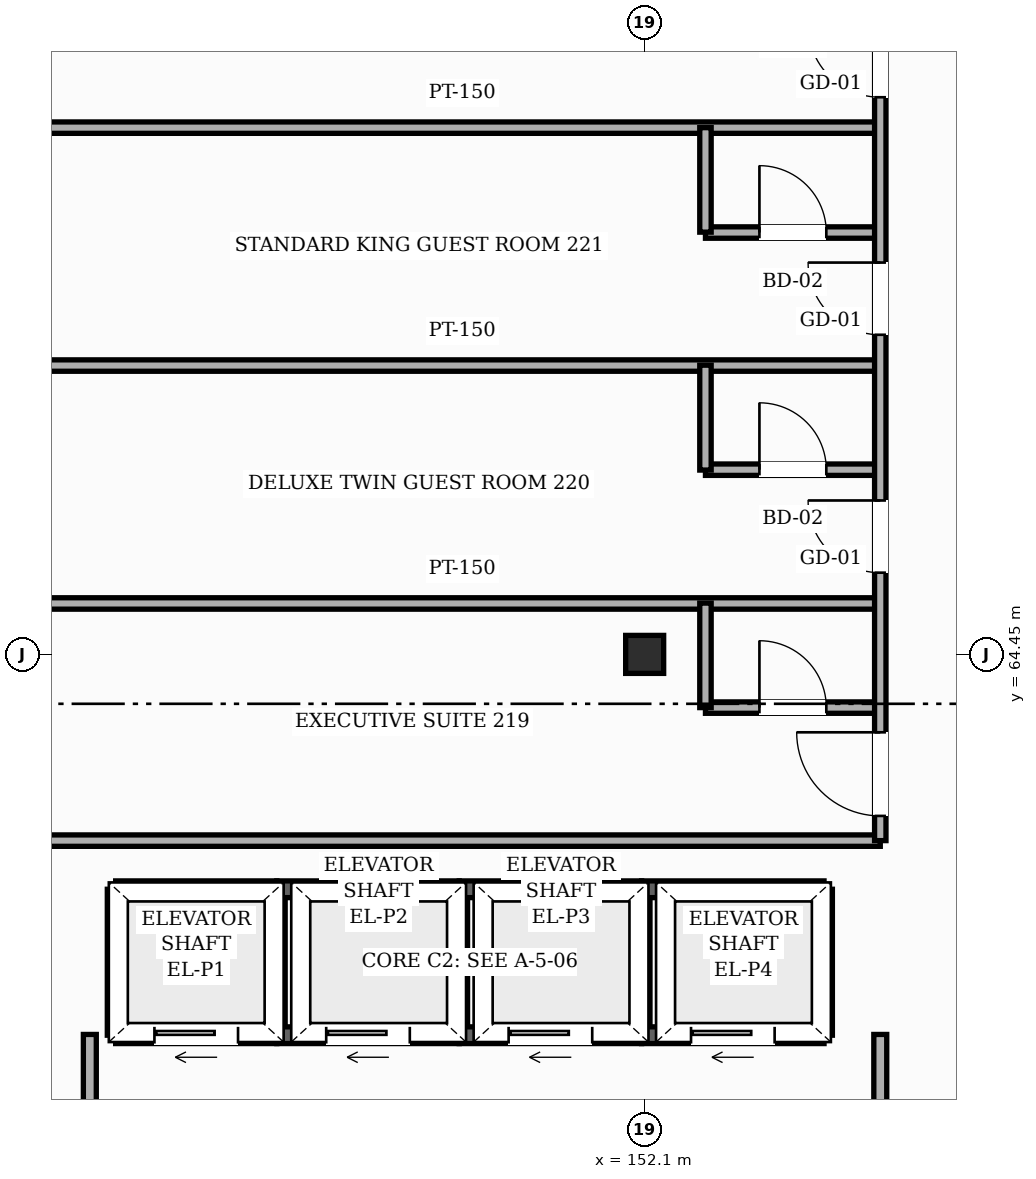
"""IFC4 building model, lengths in metres.
Left out: names, types, materials, properties, quantities, classifications, styles, units other than length and angle.
Written with IfcOpenShell. Run it as: python <this file> out.ifc"""

import sys

from ifc_helpers import new_model, si_unit, direction, frame, frame_2d, origin, origin_2d, place, context, subcontext, project, spatial, rectangle, hollow_rectangle, extrude, element, fill, save


model = new_model("IFC4")
c1 = context("Model", 3, precision=1e-05, world=origin(), true_north=direction((0.0, 1.0)))
c2 = subcontext(c1, "Body", "Model", "MODEL_VIEW")
j1 = project(units=[si_unit("LENGTHUNIT", "METRE"), si_unit("PLANEANGLEUNIT", "RADIAN")], contexts=[c1])
p1 = place(None, origin())
s1 = spatial("IfcSite", under=j1, at=p1, CompositionType="ELEMENT")
p2 = place(p1, origin())
s2 = spatial("IfcBuilding", under=s1, at=p2, CompositionType="ELEMENT")
p3 = place(p2, frame((0.0, 0.0, 35.4)))
s3 = spatial("IfcBuildingStorey", under=s2, at=p3, CompositionType="ELEMENT", Elevation=35.4)
p4 = place(p3, frame((152.1, 64.45, 0.0), z_axis=(0.0, 0.0, 1.0), x_axis=(1.0, 0.0, 0.0)))
e1 = element("IfcColumn", 1, at=p4, inside=s3, PredefinedType="COLUMN", context=c2, shape_type="SweptSolid", body=[
    extrude(hollow_rectangle(XDim=0.5, YDim=0.5, WallThickness=0.022, InnerFilletRadius=0.022, OuterFilletRadius=0.044, at=origin_2d()), origin(), (0.0, 0.0, 1.0), 3.6),
])
p5 = place(p3, frame((145.14, 61.36, 0.0), z_axis=(0.0, 0.0, 1.0), x_axis=(1.0, 0.0, 0.0)))
e2 = element("IfcWall", 2, at=p5, inside=s3, PredefinedType="SHEAR", context=c2, shape_type="SweptSolid", body=[
    extrude(rectangle(XDim=2.12, YDim=0.22, at=frame_2d((1.06, 0.0))), origin(), (0.0, 0.0, 1.0), 3.38),
])
p6 = place(p3, frame((145.14, 59.44, 0.0), z_axis=(0.0, 0.0, 1.0), x_axis=(1.0, 0.0, 0.0)))
e3 = element("IfcWall", 3, at=p6, inside=s3, PredefinedType="SHEAR", context=c2, shape_type="SweptSolid", body=[
    extrude(rectangle(XDim=2.12, YDim=0.22, at=frame_2d((1.06, 0.0))), origin(), (0.0, 0.0, 1.0), 3.38),
])
p7 = place(p6, frame((0.51, 0.0, 0.0)))
e4 = element("IfcOpeningElement", 4, at=p7, cuts=e3, PredefinedType="OPENING", context=c2, shape_type="SweptSolid", body=[
    extrude(rectangle(XDim=1.1, YDim=2.2, at=frame_2d((0.55, 1.1))), frame((0.0, 0.12, 0.0), z_axis=(0.0, -1.0, 0.0), x_axis=(1.0, 0.0, 0.0)), (0.0, 0.0, 1.0), 0.24),
])
for number, where, z_axis, x_axis in (
    (5, (147.26, 59.44, 0.0), (0.0, 0.0, 1.0), (0.0, 1.0, 0.0)),
    (6, (145.14, 59.44, 0.0), (0.0, 0.0, 1.0), (0.0, 1.0, 0.0)),
):
    element("IfcWall", number, at=place(p3, frame(where, z_axis=z_axis, x_axis=x_axis)), inside=s3, PredefinedType="SHEAR", context=c2, shape_type="SweptSolid", body=[
        extrude(rectangle(XDim=1.92, YDim=0.22, at=frame_2d((0.96, 0.0))), origin(), (0.0, 0.0, 1.0), 3.38),
    ])
p8 = place(p3, frame((147.26, 61.36, 0.0), z_axis=(0.0, 0.0, 1.0), x_axis=(1.0, 0.0, 0.0)))
e7 = element("IfcWall", 7, at=p8, inside=s3, PredefinedType="SHEAR", context=c2, shape_type="SweptSolid", body=[
    extrude(rectangle(XDim=2.4, YDim=0.22, at=frame_2d((1.2, 0.0))), origin(), (0.0, 0.0, 1.0), 3.38),
])
p9 = place(p3, frame((147.26, 59.44, 0.0), z_axis=(0.0, 0.0, 1.0), x_axis=(1.0, 0.0, 0.0)))
e8 = element("IfcWall", 8, at=p9, inside=s3, PredefinedType="SHEAR", context=c2, shape_type="SweptSolid", body=[
    extrude(rectangle(XDim=2.4, YDim=0.22, at=frame_2d((1.2, 0.0))), origin(), (0.0, 0.0, 1.0), 3.38),
])
p10 = place(p9, frame((0.65, 0.0, 0.0)))
e9 = element("IfcOpeningElement", 9, at=p10, cuts=e8, PredefinedType="OPENING", context=c2, shape_type="SweptSolid", body=[
    extrude(rectangle(XDim=1.1, YDim=2.2, at=frame_2d((0.55, 1.1))), frame((0.0, 0.12, 0.0), z_axis=(0.0, -1.0, 0.0), x_axis=(1.0, 0.0, 0.0)), (0.0, 0.0, 1.0), 0.24),
])
p11 = place(p3, frame((149.66, 59.44, 0.0), z_axis=(0.0, 0.0, 1.0), x_axis=(0.0, 1.0, 0.0)))
e10 = element("IfcWall", 10, at=p11, inside=s3, PredefinedType="SHEAR", context=c2, shape_type="SweptSolid", body=[
    extrude(rectangle(XDim=1.92, YDim=0.22, at=frame_2d((0.96, 0.0))), origin(), (0.0, 0.0, 1.0), 3.38),
])
p12 = place(p3, frame((149.66, 61.36, 0.0), z_axis=(0.0, 0.0, 1.0), x_axis=(1.0, 0.0, 0.0)))
e11 = element("IfcWall", 11, at=p12, inside=s3, PredefinedType="SHEAR", context=c2, shape_type="SweptSolid", body=[
    extrude(rectangle(XDim=2.4, YDim=0.22, at=frame_2d((1.2, 0.0))), origin(), (0.0, 0.0, 1.0), 3.38),
])
p13 = place(p3, frame((149.66, 59.44, 0.0), z_axis=(0.0, 0.0, 1.0), x_axis=(1.0, 0.0, 0.0)))
e12 = element("IfcWall", 12, at=p13, inside=s3, PredefinedType="SHEAR", context=c2, shape_type="SweptSolid", body=[
    extrude(rectangle(XDim=2.4, YDim=0.22, at=frame_2d((1.2, 0.0))), origin(), (0.0, 0.0, 1.0), 3.38),
])
p14 = place(p13, frame((0.65, 0.0, 0.0)))
e13 = element("IfcOpeningElement", 13, at=p14, cuts=e12, PredefinedType="OPENING", context=c2, shape_type="SweptSolid", body=[
    extrude(rectangle(XDim=1.1, YDim=2.2, at=frame_2d((0.55, 1.1))), frame((0.0, 0.12, 0.0), z_axis=(0.0, -1.0, 0.0), x_axis=(1.0, 0.0, 0.0)), (0.0, 0.0, 1.0), 0.24),
])
p15 = place(p3, frame((152.06, 59.44, 0.0), z_axis=(0.0, 0.0, 1.0), x_axis=(0.0, 1.0, 0.0)))
e14 = element("IfcWall", 14, at=p15, inside=s3, PredefinedType="SHEAR", context=c2, shape_type="SweptSolid", body=[
    extrude(rectangle(XDim=1.92, YDim=0.22, at=frame_2d((0.96, 0.0))), origin(), (0.0, 0.0, 1.0), 3.38),
])
p16 = place(p3, frame((152.06, 61.36, 0.0), z_axis=(0.0, 0.0, 1.0), x_axis=(1.0, 0.0, 0.0)))
e15 = element("IfcWall", 15, at=p16, inside=s3, PredefinedType="SHEAR", context=c2, shape_type="SweptSolid", body=[
    extrude(rectangle(XDim=2.4, YDim=0.22, at=frame_2d((1.2, 0.0))), origin(), (0.0, 0.0, 1.0), 3.38),
])
p17 = place(p3, frame((152.06, 59.44, 0.0), z_axis=(0.0, 0.0, 1.0), x_axis=(1.0, 0.0, 0.0)))
e16 = element("IfcWall", 16, at=p17, inside=s3, PredefinedType="SHEAR", context=c2, shape_type="SweptSolid", body=[
    extrude(rectangle(XDim=2.4, YDim=0.22, at=frame_2d((1.2, 0.0))), origin(), (0.0, 0.0, 1.0), 3.38),
])
p18 = place(p17, frame((0.65, 0.0, 0.0)))
e17 = element("IfcOpeningElement", 17, at=p18, cuts=e16, PredefinedType="OPENING", context=c2, shape_type="SweptSolid", body=[
    extrude(rectangle(XDim=1.1, YDim=2.2, at=frame_2d((0.55, 1.1))), frame((0.0, 0.12, 0.0), z_axis=(0.0, -1.0, 0.0), x_axis=(1.0, 0.0, 0.0)), (0.0, 0.0, 1.0), 0.24),
])
p19 = place(p3, frame((154.46, 59.44, 0.0), z_axis=(0.0, 0.0, 1.0), x_axis=(0.0, 1.0, 0.0)))
e18 = element("IfcWall", 18, at=p19, inside=s3, PredefinedType="SHEAR", context=c2, shape_type="SweptSolid", body=[
    extrude(rectangle(XDim=1.92, YDim=0.22, at=frame_2d((0.96, 0.0))), origin(), (0.0, 0.0, 1.0), 3.38),
])
p20 = place(p3, frame((144.2, 62.0, 0.0), z_axis=(0.0, 0.0, 1.0), x_axis=(1.0, 0.0, 0.0)))
e19 = element("IfcWall", 19, at=p20, inside=s3, PredefinedType="PARTITIONING", context=c2, shape_type="SweptSolid", body=[
    extrude(rectangle(XDim=11.0, YDim=0.15, at=frame_2d((5.5, 0.0))), origin(), (0.0, 0.0, 1.0), 3.365),
])
p21 = place(p3, frame((152.9, 63.75, 0.0), z_axis=(0.0, 0.0, 1.0), x_axis=(1.0, 0.0, 0.0)))
e20 = element("IfcWall", 20, at=p21, inside=s3, PredefinedType="PARTITIONING", context=c2, shape_type="SweptSolid", body=[
    extrude(rectangle(XDim=2.3, YDim=0.15, at=frame_2d((1.15, 0.0))), origin(), (0.0, 0.0, 1.0), 3.365),
])
p22 = place(p21, frame((0.71, 0.0, 0.0)))
e21 = element("IfcOpeningElement", 21, at=p22, cuts=e20, PredefinedType="OPENING", context=c2, shape_type="SweptSolid", body=[
    extrude(rectangle(XDim=0.88, YDim=2.12, at=frame_2d((0.44, 1.06))), frame((0.0, 0.085, 0.0), z_axis=(0.0, -1.0, 0.0), x_axis=(1.0, 0.0, 0.0)), (0.0, 0.0, 1.0), 0.17),
])
p23 = place(p3, frame((144.2, 65.12, 0.0), z_axis=(0.0, 0.0, 1.0), x_axis=(1.0, 0.0, 0.0)))
e22 = element("IfcWall", 22, at=p23, inside=s3, PredefinedType="PARTITIONING", context=c2, shape_type="SweptSolid", body=[
    extrude(rectangle(XDim=11.0, YDim=0.15, at=frame_2d((5.5, 0.0))), origin(), (0.0, 0.0, 1.0), 3.365),
])
p24 = place(p3, frame((152.9, 66.88, 0.0), z_axis=(0.0, 0.0, 1.0), x_axis=(1.0, 0.0, 0.0)))
e23 = element("IfcWall", 23, at=p24, inside=s3, PredefinedType="PARTITIONING", context=c2, shape_type="SweptSolid", body=[
    extrude(rectangle(XDim=2.3, YDim=0.15, at=frame_2d((1.15, 0.0))), origin(), (0.0, 0.0, 1.0), 3.365),
])
p25 = place(p24, frame((0.71, 0.0, 0.0)))
e24 = element("IfcOpeningElement", 24, at=p25, cuts=e23, PredefinedType="OPENING", context=c2, shape_type="SweptSolid", body=[
    extrude(rectangle(XDim=0.88, YDim=2.12, at=frame_2d((0.44, 1.06))), frame((0.0, 0.085, 0.0), z_axis=(0.0, -1.0, 0.0), x_axis=(1.0, 0.0, 0.0)), (0.0, 0.0, 1.0), 0.17),
])
p26 = place(p3, frame((144.2, 68.25, 0.0), z_axis=(0.0, 0.0, 1.0), x_axis=(1.0, 0.0, 0.0)))
e25 = element("IfcWall", 25, at=p26, inside=s3, PredefinedType="PARTITIONING", context=c2, shape_type="SweptSolid", body=[
    extrude(rectangle(XDim=11.0, YDim=0.15, at=frame_2d((5.5, 0.0))), origin(), (0.0, 0.0, 1.0), 3.365),
])
p27 = place(p3, frame((152.9, 70.0, 0.0), z_axis=(0.0, 0.0, 1.0), x_axis=(1.0, 0.0, 0.0)))
e26 = element("IfcWall", 26, at=p27, inside=s3, PredefinedType="PARTITIONING", context=c2, shape_type="SweptSolid", body=[
    extrude(rectangle(XDim=2.3, YDim=0.15, at=frame_2d((1.15, 0.0))), origin(), (0.0, 0.0, 1.0), 3.365),
])
p28 = place(p27, frame((0.71, 0.0, 0.0)))
e27 = element("IfcOpeningElement", 27, at=p28, cuts=e26, PredefinedType="OPENING", context=c2, shape_type="SweptSolid", body=[
    extrude(rectangle(XDim=0.88, YDim=2.12, at=frame_2d((0.44, 1.06))), frame((0.0, 0.085, 0.0), z_axis=(0.0, -1.0, 0.0), x_axis=(1.0, 0.0, 0.0)), (0.0, 0.0, 1.0), 0.17),
])
p29 = place(p3, frame((144.2, 71.38, 0.0), z_axis=(0.0, 0.0, 1.0), x_axis=(1.0, 0.0, 0.0)))
e28 = element("IfcWall", 28, at=p29, inside=s3, PredefinedType="PARTITIONING", context=c2, shape_type="SweptSolid", body=[
    extrude(rectangle(XDim=11.0, YDim=0.15, at=frame_2d((5.5, 0.0))), origin(), (0.0, 0.0, 1.0), 3.365),
])
p30 = place(p3, frame((144.8, 53.0, 0.0), z_axis=(0.0, 0.0, 1.0), x_axis=(0.0, 1.0, 0.0)))
e29 = element("IfcWall", 29, at=p30, inside=s3, PredefinedType="PARTITIONING", context=c2, shape_type="SweptSolid", body=[
    extrude(rectangle(XDim=6.45, YDim=0.17, at=frame_2d((3.225, 0.0))), origin(), (0.0, 0.0, 1.0), 3.365),
])
p31 = place(p3, frame((152.9, 63.75, 0.0), z_axis=(0.0, 0.0, 1.0), x_axis=(0.0, 1.0, 0.0)))
e30 = element("IfcWall", 30, at=p31, inside=s3, PredefinedType="PARTITIONING", context=c2, shape_type="SweptSolid", body=[
    extrude(rectangle(XDim=1.375, YDim=0.15, at=frame_2d((0.688, 0.0))), origin(), (0.0, 0.0, 1.0), 3.365),
])
p32 = place(p3, frame((152.9, 66.875, 0.0), z_axis=(0.0, 0.0, 1.0), x_axis=(0.0, 1.0, 0.0)))
e31 = element("IfcWall", 31, at=p32, inside=s3, PredefinedType="PARTITIONING", context=c2, shape_type="SweptSolid", body=[
    extrude(rectangle(XDim=1.38, YDim=0.15, at=frame_2d((0.69, 0.0))), origin(), (0.0, 0.0, 1.0), 3.365),
])
p33 = place(p3, frame((152.9, 70.005, 0.0), z_axis=(0.0, 0.0, 1.0), x_axis=(0.0, 1.0, 0.0)))
e32 = element("IfcWall", 32, at=p33, inside=s3, PredefinedType="PARTITIONING", context=c2, shape_type="SweptSolid", body=[
    extrude(rectangle(XDim=1.375, YDim=0.15, at=frame_2d((0.688, 0.0))), origin(), (0.0, 0.0, 1.0), 3.365),
])
p34 = place(p3, frame((155.2, 53.0, 0.0), z_axis=(0.0, 0.0, 1.0), x_axis=(0.0, 1.0, 0.0)))
e33 = element("IfcWall", 33, at=p34, inside=s3, PredefinedType="PARTITIONING", context=c2, shape_type="SweptSolid", body=[
    extrude(rectangle(XDim=6.45, YDim=0.17, at=frame_2d((3.225, 0.0))), origin(), (0.0, 0.0, 1.0), 3.365),
])
p35 = place(p34, frame((2.625, 0.0, 0.0)))
e34 = element("IfcOpeningElement", 34, at=p35, cuts=e33, PredefinedType="OPENING", context=c2, shape_type="SweptSolid", body=[
    extrude(rectangle(XDim=1.2, YDim=2.2, at=frame_2d((0.6, 1.1))), frame((0.0, 0.095, 0.0), z_axis=(0.0, -1.0, 0.0), x_axis=(1.0, 0.0, 0.0)), (0.0, 0.0, 1.0), 0.19),
])
p36 = place(p3, frame((155.2, 62.0, 0.0), z_axis=(0.0, 0.0, 1.0), x_axis=(0.0, 1.0, 0.0)))
e35 = element("IfcWall", 35, at=p36, inside=s3, PredefinedType="PARTITIONING", context=c2, shape_type="SweptSolid", body=[
    extrude(rectangle(XDim=34.4, YDim=0.15, at=frame_2d((17.2, 0.0))), origin(), (0.0, 0.0, 1.0), 3.365),
])
p37 = place(p36, frame((0.325, 0.0, 0.0)))
e36 = element("IfcOpeningElement", 36, at=p37, cuts=e35, PredefinedType="OPENING", context=c2, shape_type="SweptSolid", body=[
    extrude(rectangle(XDim=1.1, YDim=2.2, at=frame_2d((0.55, 1.1))), frame((0.0, 0.085, 0.0), z_axis=(0.0, -1.0, 0.0), x_axis=(1.0, 0.0, 0.0)), (0.0, 0.0, 1.0), 0.17),
])
p38 = place(p36, frame((3.525, 0.0, 0.0)))
e37 = element("IfcOpeningElement", 37, at=p38, cuts=e35, PredefinedType="OPENING", context=c2, shape_type="SweptSolid", body=[
    extrude(rectangle(XDim=0.95, YDim=2.15, at=frame_2d((0.475, 1.075))), frame((0.0, 0.085, 0.0), z_axis=(0.0, -1.0, 0.0), x_axis=(1.0, 0.0, 0.0)), (0.0, 0.0, 1.0), 0.17),
])
p39 = place(p36, frame((6.655, 0.0, 0.0)))
e38 = element("IfcOpeningElement", 38, at=p39, cuts=e35, PredefinedType="OPENING", context=c2, shape_type="SweptSolid", body=[
    extrude(rectangle(XDim=0.95, YDim=2.15, at=frame_2d((0.475, 1.075))), frame((0.0, 0.085, 0.0), z_axis=(0.0, -1.0, 0.0), x_axis=(1.0, 0.0, 0.0)), (0.0, 0.0, 1.0), 0.17),
])
p40 = place(p36, frame((9.78, 0.0, 0.0)))
e39 = element("IfcOpeningElement", 39, at=p40, cuts=e35, PredefinedType="OPENING", context=c2, shape_type="SweptSolid", body=[
    extrude(rectangle(XDim=0.95, YDim=2.15, at=frame_2d((0.475, 1.075))), frame((0.0, 0.085, 0.0), z_axis=(0.0, -1.0, 0.0), x_axis=(1.0, 0.0, 0.0)), (0.0, 0.0, 1.0), 0.17),
])
p41 = place(p36, frame((12.91, 0.0, 0.0)))
e40 = element("IfcOpeningElement", 40, at=p41, cuts=e35, PredefinedType="OPENING", context=c2, shape_type="SweptSolid", body=[
    extrude(rectangle(XDim=0.95, YDim=2.15, at=frame_2d((0.475, 1.075))), frame((0.0, 0.085, 0.0), z_axis=(0.0, -1.0, 0.0), x_axis=(1.0, 0.0, 0.0)), (0.0, 0.0, 1.0), 0.17),
])
p42 = place(p36, frame((16.035, 0.0, 0.0)))
e41 = element("IfcOpeningElement", 41, at=p42, cuts=e35, PredefinedType="OPENING", context=c2, shape_type="SweptSolid", body=[
    extrude(rectangle(XDim=0.95, YDim=2.15, at=frame_2d((0.475, 1.075))), frame((0.0, 0.085, 0.0), z_axis=(0.0, -1.0, 0.0), x_axis=(1.0, 0.0, 0.0)), (0.0, 0.0, 1.0), 0.17),
])
p43 = place(p36, frame((19.165, 0.0, 0.0)))
e42 = element("IfcOpeningElement", 42, at=p43, cuts=e35, PredefinedType="OPENING", context=c2, shape_type="SweptSolid", body=[
    extrude(rectangle(XDim=0.95, YDim=2.15, at=frame_2d((0.475, 1.075))), frame((0.0, 0.085, 0.0), z_axis=(0.0, -1.0, 0.0), x_axis=(1.0, 0.0, 0.0)), (0.0, 0.0, 1.0), 0.17),
])
p44 = place(p36, frame((22.29, 0.0, 0.0)))
e43 = element("IfcOpeningElement", 43, at=p44, cuts=e35, PredefinedType="OPENING", context=c2, shape_type="SweptSolid", body=[
    extrude(rectangle(XDim=0.95, YDim=2.15, at=frame_2d((0.475, 1.075))), frame((0.0, 0.085, 0.0), z_axis=(0.0, -1.0, 0.0), x_axis=(1.0, 0.0, 0.0)), (0.0, 0.0, 1.0), 0.17),
])
p45 = place(p36, frame((25.42, 0.0, 0.0)))
e44 = element("IfcOpeningElement", 44, at=p45, cuts=e35, PredefinedType="OPENING", context=c2, shape_type="SweptSolid", body=[
    extrude(rectangle(XDim=0.95, YDim=2.15, at=frame_2d((0.475, 1.075))), frame((0.0, 0.085, 0.0), z_axis=(0.0, -1.0, 0.0), x_axis=(1.0, 0.0, 0.0)), (0.0, 0.0, 1.0), 0.17),
])
p46 = place(p36, frame((28.545, 0.0, 0.0)))
e45 = element("IfcOpeningElement", 45, at=p46, cuts=e35, PredefinedType="OPENING", context=c2, shape_type="SweptSolid", body=[
    extrude(rectangle(XDim=0.95, YDim=2.15, at=frame_2d((0.475, 1.075))), frame((0.0, 0.085, 0.0), z_axis=(0.0, -1.0, 0.0), x_axis=(1.0, 0.0, 0.0)), (0.0, 0.0, 1.0), 0.17),
])
p47 = place(p36, frame((31.675, 0.0, 0.0)))
e46 = element("IfcOpeningElement", 46, at=p47, cuts=e35, PredefinedType="OPENING", context=c2, shape_type="SweptSolid", body=[
    extrude(rectangle(XDim=0.95, YDim=2.15, at=frame_2d((0.475, 1.075))), frame((0.0, 0.085, 0.0), z_axis=(0.0, -1.0, 0.0), x_axis=(1.0, 0.0, 0.0)), (0.0, 0.0, 1.0), 0.17),
])
p48 = place(p7, origin())
e47 = element("IfcDoor", 47, at=p48, inside=s3, OperationType="SLIDING_TO_LEFT", PredefinedType="DOOR", context=c2, shape_type="SweptSolid", body=[
    extrude(rectangle(XDim=1.1, YDim=2.2, at=frame_2d((0.55, 1.1))), frame((0.0, 0.025, 0.0), z_axis=(0.0, -1.0, 0.0), x_axis=(1.0, 0.0, 0.0)), (0.0, 0.0, 1.0), 0.05),
])
fill(e4, e47)
p49 = place(p10, origin())
e48 = element("IfcDoor", 48, at=p49, inside=s3, OperationType="SLIDING_TO_LEFT", PredefinedType="DOOR", context=c2, shape_type="SweptSolid", body=[
    extrude(rectangle(XDim=1.1, YDim=2.2, at=frame_2d((0.55, 1.1))), frame((0.0, 0.025, 0.0), z_axis=(0.0, -1.0, 0.0), x_axis=(1.0, 0.0, 0.0)), (0.0, 0.0, 1.0), 0.05),
])
fill(e9, e48)
p50 = place(p14, origin())
e49 = element("IfcDoor", 49, at=p50, inside=s3, OperationType="SLIDING_TO_LEFT", PredefinedType="DOOR", context=c2, shape_type="SweptSolid", body=[
    extrude(rectangle(XDim=1.1, YDim=2.2, at=frame_2d((0.55, 1.1))), frame((0.0, 0.025, 0.0), z_axis=(0.0, -1.0, 0.0), x_axis=(1.0, 0.0, 0.0)), (0.0, 0.0, 1.0), 0.05),
])
fill(e13, e49)
p51 = place(p18, origin())
e50 = element("IfcDoor", 50, at=p51, inside=s3, OperationType="SLIDING_TO_LEFT", PredefinedType="DOOR", context=c2, shape_type="SweptSolid", body=[
    extrude(rectangle(XDim=1.1, YDim=2.2, at=frame_2d((0.55, 1.1))), frame((0.0, 0.025, 0.0), z_axis=(0.0, -1.0, 0.0), x_axis=(1.0, 0.0, 0.0)), (0.0, 0.0, 1.0), 0.05),
])
fill(e17, e50)
p52 = place(p37, origin())
e51 = element("IfcDoor", 51, at=p52, inside=s3, OperationType="SINGLE_SWING_RIGHT", PredefinedType="DOOR", context=c2, shape_type="SweptSolid", body=[
    extrude(rectangle(XDim=1.1, YDim=2.2, at=frame_2d((0.55, 1.1))), frame((0.0, 0.025, 0.0), z_axis=(0.0, -1.0, 0.0), x_axis=(1.0, 0.0, 0.0)), (0.0, 0.0, 1.0), 0.05),
])
fill(e36, e51)
p53 = place(p22, origin())
e52 = element("IfcDoor", 52, at=p53, inside=s3, OperationType="SINGLE_SWING_LEFT", PredefinedType="DOOR", context=c2, shape_type="SweptSolid", body=[
    extrude(rectangle(XDim=0.88, YDim=2.12, at=frame_2d((0.44, 1.06))), frame((0.0, 0.025, 0.0), z_axis=(0.0, -1.0, 0.0), x_axis=(1.0, 0.0, 0.0)), (0.0, 0.0, 1.0), 0.05),
])
fill(e21, e52)
p54 = place(p38, origin())
e53 = element("IfcDoor", 53, at=p54, inside=s3, OperationType="SINGLE_SWING_RIGHT", PredefinedType="DOOR", context=c2, shape_type="SweptSolid", body=[
    extrude(rectangle(XDim=0.95, YDim=2.15, at=frame_2d((0.475, 1.075))), frame((0.0, 0.025, 0.0), z_axis=(0.0, -1.0, 0.0), x_axis=(1.0, 0.0, 0.0)), (0.0, 0.0, 1.0), 0.05),
])
fill(e37, e53)
p55 = place(p25, origin())
e54 = element("IfcDoor", 54, at=p55, inside=s3, OperationType="SINGLE_SWING_LEFT", PredefinedType="DOOR", context=c2, shape_type="SweptSolid", body=[
    extrude(rectangle(XDim=0.88, YDim=2.12, at=frame_2d((0.44, 1.06))), frame((0.0, 0.025, 0.0), z_axis=(0.0, -1.0, 0.0), x_axis=(1.0, 0.0, 0.0)), (0.0, 0.0, 1.0), 0.05),
])
fill(e24, e54)
p56 = place(p39, origin())
e55 = element("IfcDoor", 55, at=p56, inside=s3, OperationType="SINGLE_SWING_RIGHT", PredefinedType="DOOR", context=c2, shape_type="SweptSolid", body=[
    extrude(rectangle(XDim=0.95, YDim=2.15, at=frame_2d((0.475, 1.075))), frame((0.0, 0.025, 0.0), z_axis=(0.0, -1.0, 0.0), x_axis=(1.0, 0.0, 0.0)), (0.0, 0.0, 1.0), 0.05),
])
fill(e38, e55)
p57 = place(p28, origin())
e56 = element("IfcDoor", 56, at=p57, inside=s3, OperationType="SINGLE_SWING_LEFT", PredefinedType="DOOR", context=c2, shape_type="SweptSolid", body=[
    extrude(rectangle(XDim=0.88, YDim=2.12, at=frame_2d((0.44, 1.06))), frame((0.0, 0.025, 0.0), z_axis=(0.0, -1.0, 0.0), x_axis=(1.0, 0.0, 0.0)), (0.0, 0.0, 1.0), 0.05),
])
fill(e27, e56)
p58 = place(p40, origin())
e57 = element("IfcDoor", 57, at=p58, inside=s3, OperationType="SINGLE_SWING_RIGHT", PredefinedType="DOOR", context=c2, shape_type="SweptSolid", body=[
    extrude(rectangle(XDim=0.95, YDim=2.15, at=frame_2d((0.475, 1.075))), frame((0.0, 0.025, 0.0), z_axis=(0.0, -1.0, 0.0), x_axis=(1.0, 0.0, 0.0)), (0.0, 0.0, 1.0), 0.05),
])
fill(e39, e57)
save(model, sys.argv[1])
